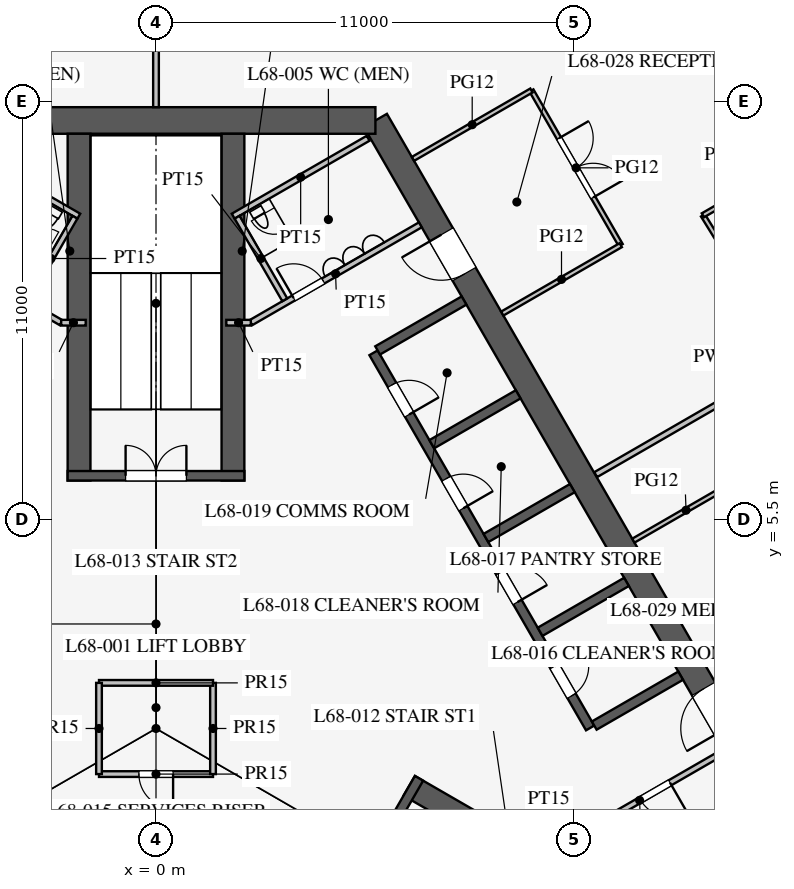
"""IFC4 building model, lengths in metres.
Left out: names, types, materials, properties, quantities, classifications, styles, units other than length and angle.
Written with IfcOpenShell. Run it as: python <this file> out.ifc"""

import sys

from ifc_helpers import new_model, si_unit, direction, frame, frame_2d, origin, place, context, subcontext, project, spatial, rectangle, extrude, element, fill, save


model = new_model("IFC4")
c1 = context("Model", 3, precision=1e-05, world=origin(), true_north=direction((0.0, 1.0)))
c2 = subcontext(c1, "Body", "Model", "MODEL_VIEW")
j1 = project(units=[si_unit("LENGTHUNIT", "METRE"), si_unit("PLANEANGLEUNIT", "RADIAN")], contexts=[c1])
p1 = place(None, origin())
s1 = spatial("IfcSite", under=j1, at=p1, CompositionType="ELEMENT")
p2 = place(p1, origin())
s2 = spatial("IfcBuilding", under=s1, at=p2, CompositionType="ELEMENT")
p3 = place(p2, frame((0.0, 0.0, 297.3)))
s3 = spatial("IfcBuildingStorey", under=s2, at=p3, CompositionType="ELEMENT", Elevation=297.3)
p4 = place(p3, frame((16.743, -3.0, 0.0), z_axis=(0.0, 0.0, 1.0), x_axis=(-0.500002442456, 0.866023993627, 0.0)))
e1 = element("IfcWall", 1, at=p4, inside=s3, PredefinedType="SHEAR", context=c2, shape_type="SweptSolid", body=[
    extrude(rectangle(XDim=21.939, YDim=0.7, at=frame_2d((10.97, 0.0))), origin(), (0.0, 0.0, 1.0), 4.2),
])
p5 = place(p4, frame((17.27, 0.0, 0.0)))
e2 = element("IfcOpeningElement", 2, at=p5, cuts=e1, PredefinedType="OPENING", context=c2, shape_type="SweptSolid", body=[
    extrude(rectangle(XDim=1.2, YDim=2.1, at=frame_2d((0.6, 1.05))), frame((0.0, 0.36, 0.0), z_axis=(0.0, -1.0, 0.0), x_axis=(1.0, 0.0, 0.0)), (0.0, 0.0, 1.0), 0.72),
])
p6 = place(p4, frame((3.47, 0.0, 0.0)))
e3 = element("IfcOpeningElement", 3, at=p6, cuts=e1, PredefinedType="OPENING", context=c2, shape_type="SweptSolid", body=[
    extrude(rectangle(XDim=1.2, YDim=2.1, at=frame_2d((0.6, 1.05))), frame((0.0, 0.36, 0.0), z_axis=(0.0, -1.0, 0.0), x_axis=(1.0, 0.0, 0.0)), (0.0, 0.0, 1.0), 0.72),
])
p7 = place(p3, frame((5.773, 16.0, 0.0), z_axis=(0.0, 0.0, 1.0), x_axis=(-1.0, 0.0, 0.0)))
e4 = element("IfcWall", 4, at=p7, inside=s3, PredefinedType="SHEAR", context=c2, shape_type="SweptSolid", body=[
    extrude(rectangle(XDim=11.547, YDim=0.7, at=frame_2d((5.773, 0.0))), origin(), (0.0, 0.0, 1.0), 4.2),
])
p8 = place(p3, frame((11.424, 0.014, 0.0), z_axis=(0.0, 0.0, 1.0), x_axis=(-0.500001763848, 0.866024385424, 0.0)))
e5 = element("IfcWall", 5, at=p8, inside=s3, PredefinedType="SHEAR", context=c2, shape_type="SweptSolid", body=[
    extrude(rectangle(XDim=11.4, YDim=0.25, at=frame_2d((5.7, 0.0))), origin(), (0.0, 0.0, 1.0), 4.2),
])
p9 = place(p8, frame((0.975, 0.0, 0.0)))
e6 = element("IfcOpeningElement", 6, at=p9, cuts=e5, PredefinedType="OPENING", context=c2, shape_type="SweptSolid", body=[
    extrude(rectangle(XDim=0.9, YDim=2.1, at=frame_2d((0.45, 1.05))), frame((0.0, 0.135, 0.0), z_axis=(0.0, -1.0, 0.0), x_axis=(1.0, 0.0, 0.0)), (0.0, 0.0, 1.0), 0.27),
])
p10 = place(p8, frame((3.825, 0.0, 0.0)))
e7 = element("IfcOpeningElement", 7, at=p10, cuts=e5, PredefinedType="OPENING", context=c2, shape_type="SweptSolid", body=[
    extrude(rectangle(XDim=0.9, YDim=2.1, at=frame_2d((0.45, 1.05))), frame((0.0, 0.135, 0.0), z_axis=(0.0, -1.0, 0.0), x_axis=(1.0, 0.0, 0.0)), (0.0, 0.0, 1.0), 0.27),
])
p11 = place(p8, frame((6.675, 0.0, 0.0)))
e8 = element("IfcOpeningElement", 8, at=p11, cuts=e5, PredefinedType="OPENING", context=c2, shape_type="SweptSolid", body=[
    extrude(rectangle(XDim=0.9, YDim=2.1, at=frame_2d((0.45, 1.05))), frame((0.0, 0.135, 0.0), z_axis=(0.0, -1.0, 0.0), x_axis=(1.0, 0.0, 0.0)), (0.0, 0.0, 1.0), 0.27),
])
p12 = place(p8, frame((9.525, 0.0, 0.0)))
e9 = element("IfcOpeningElement", 9, at=p12, cuts=e5, PredefinedType="OPENING", context=c2, shape_type="SweptSolid", body=[
    extrude(rectangle(XDim=0.9, YDim=2.1, at=frame_2d((0.45, 1.05))), frame((0.0, 0.135, 0.0), z_axis=(0.0, -1.0, 0.0), x_axis=(1.0, 0.0, 0.0)), (0.0, 0.0, 1.0), 0.27),
])
for number, where, z_axis, x_axis in (
    (10, (11.532, 0.076, 0.0), (0.0, 0.0, 1.0), (0.866, 0.5, 0.0)),
    (11, (10.107, 2.544, 0.0), (0.0, 0.0, 1.0), (0.866, 0.5, 0.0)),
    (12, (8.682, 5.012, 0.0), (0.0, 0.0, 1.0), (0.866, 0.5, 0.0)),
    (13, (7.257, 7.481, 0.0), (0.0, 0.0, 1.0), (0.866, 0.5, 0.0)),
    (14, (5.832, 9.949, 0.0), (0.0, 0.0, 1.0), (0.866, 0.5, 0.0)),
):
    element("IfcWall", number, at=place(p3, frame(where, z_axis=z_axis, x_axis=x_axis)), inside=s3, PredefinedType="SHEAR", context=c2, shape_type="SweptSolid", body=[
        extrude(rectangle(XDim=2.625, YDim=0.25, at=frame_2d((1.312, 0.0))), origin(), (0.0, 0.0, 1.0), 4.2),
    ])
p13 = place(p3, frame((6.663, -1.509, 0.0), z_axis=(0.0, 0.0, 1.0), x_axis=(0.866028310072, -0.499994966129, 0.0)))
e15 = element("IfcWall", 15, at=p13, inside=s3, PredefinedType="SHEAR", context=c2, shape_type="SweptSolid", body=[
    extrude(rectangle(XDim=9.125, YDim=0.6, at=frame_2d((4.562, 0.0))), origin(), (0.0, 0.0, 1.0), 4.2),
])
p14 = place(p3, frame((4.597, -5.339, 0.0), z_axis=(0.0, 0.0, 1.0), x_axis=(0.499984536904, 0.866034331223, 0.0)))
e16 = element("IfcWall", 16, at=p14, inside=s3, PredefinedType="SHEAR", context=c2, shape_type="SweptSolid", body=[
    extrude(rectangle(XDim=4.65, YDim=0.25, at=frame_2d((2.325, 0.0))), origin(), (0.0, 0.0, 1.0), 4.2),
])
p15 = place(p14, frame((1.525, 0.0, 0.0)))
e17 = element("IfcOpeningElement", 17, at=p15, cuts=e16, PredefinedType="OPENING", context=c2, shape_type="SweptSolid", body=[
    extrude(rectangle(XDim=1.6, YDim=2.1, at=frame_2d((0.8, 1.05))), frame((0.0, 0.135, 0.0), z_axis=(0.0, -1.0, 0.0), x_axis=(1.0, 0.0, 0.0)), (0.0, 0.0, 1.0), 0.27),
])
for number, where, z_axis, x_axis in (
    (18, (2.025, 6.525, 0.0), (0.0, 0.0, 1.0), (0.0, 1.0, 0.0)),
    (19, (-2.025, 6.525, 0.0), (0.0, 0.0, 1.0), (0.0, 1.0, 0.0)),
):
    element("IfcWall", number, at=place(p3, frame(where, z_axis=z_axis, x_axis=x_axis)), inside=s3, PredefinedType="SHEAR", context=c2, shape_type="SweptSolid", body=[
        extrude(rectangle(XDim=9.125, YDim=0.6, at=frame_2d((4.562, 0.0))), origin(), (0.0, 0.0, 1.0), 4.2),
    ])
p16 = place(p3, frame((2.325, 6.65, 0.0), z_axis=(0.0, 0.0, 1.0), x_axis=(-1.0, 0.0, 0.0)))
e20 = element("IfcWall", 20, at=p16, inside=s3, PredefinedType="SHEAR", context=c2, shape_type="SweptSolid", body=[
    extrude(rectangle(XDim=4.65, YDim=0.25, at=frame_2d((2.325, 0.0))), origin(), (0.0, 0.0, 1.0), 4.2),
])
p17 = place(p16, frame((1.525, 0.0, 0.0)))
e21 = element("IfcOpeningElement", 21, at=p17, cuts=e20, PredefinedType="OPENING", context=c2, shape_type="SweptSolid", body=[
    extrude(rectangle(XDim=1.6, YDim=2.1, at=frame_2d((0.8, 1.05))), frame((0.0, 0.135, 0.0), z_axis=(0.0, -1.0, 0.0), x_axis=(1.0, 0.0, 0.0)), (0.0, 0.0, 1.0), 0.27),
])
p18 = place(p3, frame((2.495, 10.678, 0.0), z_axis=(0.0, 0.0, 1.0), x_axis=(0.866037967349, 0.499978238636, 0.0)))
e22 = element("IfcWall", 22, at=p18, inside=s3, PredefinedType="PARTITIONING", context=c2, shape_type="SweptSolid", body=[
    extrude(rectangle(XDim=5.15, YDim=0.15, at=frame_2d((2.575, 0.0))), origin(), (0.0, 0.0, 1.0), 4.0),
])
p19 = place(p18, frame((1.3, 0.0, 0.0)))
e23 = element("IfcOpeningElement", 23, at=p19, cuts=e22, PredefinedType="OPENING", context=c2, shape_type="SweptSolid", body=[
    extrude(rectangle(XDim=0.9, YDim=2.1, at=frame_2d((0.45, 1.05))), frame((0.0, 0.085, 0.0), z_axis=(0.0, -1.0, 0.0), x_axis=(1.0, 0.0, 0.0)), (0.0, 0.0, 1.0), 0.17),
])
p20 = place(p3, frame((10.495, -3.178, 0.0), z_axis=(0.0, 0.0, 1.0), x_axis=(0.866037967349, 0.499978238636, 0.0)))
e24 = element("IfcWall", 24, at=p20, inside=s3, PredefinedType="PARTITIONING", context=c2, shape_type="SweptSolid", body=[
    extrude(rectangle(XDim=5.15, YDim=0.15, at=frame_2d((2.575, 0.0))), origin(), (0.0, 0.0, 1.0), 4.0),
])
p21 = place(p20, frame((2.6, 0.0, 0.0)))
e25 = element("IfcOpeningElement", 25, at=p21, cuts=e24, PredefinedType="OPENING", context=c2, shape_type="SweptSolid", body=[
    extrude(rectangle(XDim=0.9, YDim=2.1, at=frame_2d((0.45, 1.05))), frame((0.0, 0.085, 0.0), z_axis=(0.0, -1.0, 0.0), x_axis=(1.0, 0.0, 0.0)), (0.0, 0.0, 1.0), 0.17),
])
p22 = place(p3, frame((-2.495, 10.678, 0.0), z_axis=(0.0, 0.0, 1.0), x_axis=(-0.866037967349, 0.499978238636, 0.0)))
e26 = element("IfcWall", 26, at=p22, inside=s3, PredefinedType="PARTITIONING", context=c2, shape_type="SweptSolid", body=[
    extrude(rectangle(XDim=5.15, YDim=0.15, at=frame_2d((2.575, 0.0))), origin(), (0.0, 0.0, 1.0), 4.0),
])
p23 = place(p22, frame((2.6, 0.0, 0.0)))
e27 = element("IfcOpeningElement", 27, at=p23, cuts=e26, PredefinedType="OPENING", context=c2, shape_type="SweptSolid", body=[
    extrude(rectangle(XDim=0.9, YDim=2.1, at=frame_2d((0.45, 1.05))), frame((0.0, 0.085, 0.0), z_axis=(0.0, -1.0, 0.0), x_axis=(1.0, 0.0, 0.0)), (0.0, 0.0, 1.0), 0.17),
])
for number, where, z_axis, x_axis in (
    (28, (2.495, 10.678, 0.0), (0.0, 0.0, 1.0), (-1.0, 0.0, 0.0)),
    (29, (-2.495, 10.678, 0.0), (0.0, 0.0, 1.0), (1.0, 0.0, 0.0)),
):
    element("IfcWall", number, at=place(p3, frame(where, z_axis=z_axis, x_axis=x_axis)), inside=s3, PredefinedType="PARTITIONING", context=c2, shape_type="SweptSolid", body=[
        extrude(rectangle(XDim=0.645, YDim=0.15, at=frame_2d((0.323, 0.0))), origin(), (0.0, 0.0, 1.0), 4.0),
    ])
p24 = place(p3, frame((2.031, 13.482, 0.0), z_axis=(0.0, 0.0, 1.0), x_axis=(0.866050731258, 0.499956128963, 0.0)))
e30 = element("IfcWall", 30, at=p24, inside=s3, PredefinedType="PARTITIONING", context=c2, shape_type="SweptSolid", body=[
    extrude(rectangle(XDim=4.1, YDim=0.15, at=frame_2d((2.05, 0.0))), origin(), (0.0, 0.0, 1.0), 4.0),
])
p25 = place(p3, frame((3.389, 11.281, 0.0), z_axis=(0.0, 0.0, 1.0), x_axis=(-0.499989096993, 0.866031698547, 0.0)))
e31 = element("IfcWall", 31, at=p25, inside=s3, PredefinedType="PARTITIONING", context=c2, shape_type="SweptSolid", body=[
    extrude(rectangle(XDim=2.51, YDim=0.15, at=frame_2d((1.255, 0.0))), origin(), (0.0, 0.0, 1.0), 4.0),
])
p26 = place(p3, frame((-2.031, 13.482, 0.0), z_axis=(0.0, 0.0, 1.0), x_axis=(-0.866050731258, 0.499956128963, 0.0)))
e32 = element("IfcWall", 32, at=p26, inside=s3, PredefinedType="PARTITIONING", context=c2, shape_type="SweptSolid", body=[
    extrude(rectangle(XDim=4.1, YDim=0.15, at=frame_2d((2.05, 0.0))), origin(), (0.0, 0.0, 1.0), 4.0),
])
p27 = place(p3, frame((-3.389, 11.281, 0.0), z_axis=(0.0, 0.0, 1.0), x_axis=(0.499989096993, 0.866031698547, 0.0)))
e33 = element("IfcWall", 33, at=p27, inside=s3, PredefinedType="PARTITIONING", context=c2, shape_type="SweptSolid", body=[
    extrude(rectangle(XDim=2.51, YDim=0.15, at=frame_2d((1.255, 0.0))), origin(), (0.0, 0.0, 1.0), 4.0),
])
p28 = place(p3, frame((-1.5, -1.2, 0.0), z_axis=(0.0, 0.0, 1.0), x_axis=(1.0, 0.0, 0.0)))
e34 = element("IfcWall", 34, at=p28, inside=s3, PredefinedType="PARTITIONING", context=c2, shape_type="SweptSolid", body=[
    extrude(rectangle(XDim=3.0, YDim=0.15, at=frame_2d((1.5, 0.0))), origin(), (0.0, 0.0, 1.0), 4.0),
])
p29 = place(p28, frame((1.05, 0.0, 0.0)))
e35 = element("IfcOpeningElement", 35, at=p29, cuts=e34, PredefinedType="OPENING", context=c2, shape_type="SweptSolid", body=[
    extrude(rectangle(XDim=0.9, YDim=2.1, at=frame_2d((0.45, 1.05))), frame((0.0, 0.085, 0.0), z_axis=(0.0, -1.0, 0.0), x_axis=(1.0, 0.0, 0.0)), (0.0, 0.0, 1.0), 0.17),
])
p30 = place(p3, frame((1.5, -1.2, 0.0), z_axis=(0.0, 0.0, 1.0), x_axis=(0.0, 1.0, 0.0)))
e36 = element("IfcWall", 36, at=p30, inside=s3, PredefinedType="PARTITIONING", context=c2, shape_type="SweptSolid", body=[
    extrude(rectangle(XDim=2.4, YDim=0.15, at=frame_2d((1.2, 0.0))), origin(), (0.0, 0.0, 1.0), 4.0),
])
p31 = place(p3, frame((1.5, 1.2, 0.0), z_axis=(0.0, 0.0, 1.0), x_axis=(-1.0, 0.0, 0.0)))
e37 = element("IfcWall", 37, at=p31, inside=s3, PredefinedType="PARTITIONING", context=c2, shape_type="SweptSolid", body=[
    extrude(rectangle(XDim=3.0, YDim=0.15, at=frame_2d((1.5, 0.0))), origin(), (0.0, 0.0, 1.0), 4.0),
])
p32 = place(p3, frame((-1.5, 1.2, 0.0), z_axis=(0.0, 0.0, 1.0), x_axis=(0.0, -1.0, 0.0)))
e38 = element("IfcWall", 38, at=p32, inside=s3, PredefinedType="PARTITIONING", context=c2, shape_type="SweptSolid", body=[
    extrude(rectangle(XDim=2.4, YDim=0.15, at=frame_2d((1.2, 0.0))), origin(), (0.0, 0.0, 1.0), 4.0),
])
p33 = place(p3, frame((0.0, 16.35, 0.0), z_axis=(0.0, 0.0, 1.0), x_axis=(0.0, 1.0, 0.0)))
e39 = element("IfcWall", 39, at=p33, inside=s3, PredefinedType="PARTITIONING", context=c2, shape_type="SweptSolid", body=[
    extrude(rectangle(XDim=13.4, YDim=0.15, at=frame_2d((6.7, 0.0))), origin(), (0.0, 0.0, 1.0), 2.5),
])
p34 = place(p3, frame((11.57, 6.68, 0.0), z_axis=(0.0, 0.0, 1.0), x_axis=(0.866019635725, 0.500009990439, 0.0)))
e40 = element("IfcWall", 40, at=p34, inside=s3, PredefinedType="PARTITIONING", context=c2, shape_type="SweptSolid", body=[
    extrude(rectangle(XDim=9.212, YDim=0.15, at=frame_2d((4.606, 0.0))), origin(), (0.0, 0.0, 1.0), 3.3),
])
p35 = place(p3, frame((12.229, 12.719, 0.0), z_axis=(0.0, 0.0, 1.0), x_axis=(-0.500016218704, 0.866016039709, 0.0)))
e41 = element("IfcWall", 41, at=p35, inside=s3, PredefinedType="PARTITIONING", context=c2, shape_type="SweptSolid", body=[
    extrude(rectangle(XDim=4.7, YDim=0.12, at=frame_2d((2.35, 0.0))), origin(), (0.0, 0.0, 1.0), 2.9),
])
p36 = place(p35, frame((1.45, 0.0, 0.15)))
e42 = element("IfcOpeningElement", 42, at=p36, cuts=e41, PredefinedType="OPENING", context=c2, shape_type="SweptSolid", body=[
    extrude(rectangle(XDim=1.8, YDim=2.1, at=frame_2d((0.9, 1.05))), frame((0.0, 0.07, 0.0), z_axis=(0.0, -1.0, 0.0), x_axis=(1.0, 0.0, 0.0)), (0.0, 0.0, 1.0), 0.14),
])
p37 = place(p3, frame((9.111, 10.918, 0.0), z_axis=(0.0, 0.0, 1.0), x_axis=(0.866035395735, 0.499982693035, 0.0)))
e43 = element("IfcWall", 43, at=p37, inside=s3, PredefinedType="PARTITIONING", context=c2, shape_type="SweptSolid", body=[
    extrude(rectangle(XDim=3.6, YDim=0.12, at=frame_2d((1.8, 0.0))), origin(), (0.0, 0.0, 1.0), 2.9),
])
p38 = place(p3, frame((6.761, 14.989, 0.0), z_axis=(0.0, 0.0, 1.0), x_axis=(0.866018442252, 0.500012057535, 0.0)))
e44 = element("IfcWall", 44, at=p38, inside=s3, PredefinedType="PARTITIONING", context=c2, shape_type="SweptSolid", body=[
    extrude(rectangle(XDim=3.6, YDim=0.12, at=frame_2d((1.8, 0.0))), origin(), (0.0, 0.0, 1.0), 2.9),
])
p39 = place(p3, frame((12.562, 4.943, 0.0), z_axis=(0.0, 0.0, 1.0), x_axis=(0.866008981251, 0.500028443584, 0.0)))
e45 = element("IfcWall", 45, at=p39, inside=s3, PredefinedType="PARTITIONING", context=c2, shape_type="SweptSolid", body=[
    extrude(rectangle(XDim=3.2, YDim=0.12, at=frame_2d((1.6, 0.0))), origin(), (0.0, 0.0, 1.0), 2.9),
])
p40 = place(p3, frame((14.361, 1.825, 0.0), z_axis=(0.0, 0.0, 1.0), x_axis=(0.866028054938, 0.499995408039, 0.0)))
e46 = element("IfcWall", 46, at=p40, inside=s3, PredefinedType="PARTITIONING", context=c2, shape_type="SweptSolid", body=[
    extrude(rectangle(XDim=3.2, YDim=0.12, at=frame_2d((1.6, 0.0))), origin(), (0.0, 0.0, 1.0), 2.9),
])
p41 = place(p3, frame((16.759, 9.676, 0.0), z_axis=(0.0, 0.0, 1.0), x_axis=(-0.525996140194, 0.850486954927, 0.0)))
e47 = element("IfcWall", 47, at=p41, inside=s3, PredefinedType="PARTITIONING", context=c2, shape_type="SweptSolid", body=[
    extrude(rectangle(XDim=4.502, YDim=0.12, at=frame_2d((2.251, 0.0))), origin(), (0.0, 0.0, 1.0), 2.9),
])
p42 = place(p41, frame((1.75, 0.0, 0.15)))
e48 = element("IfcOpeningElement", 48, at=p42, cuts=e47, PredefinedType="OPENING", context=c2, shape_type="SweptSolid", body=[
    extrude(rectangle(XDim=1.0, YDim=2.1, at=frame_2d((0.5, 1.05))), frame((0.0, 0.07, 0.0), z_axis=(0.0, -1.0, 0.0), x_axis=(1.0, 0.0, 0.0)), (0.0, 0.0, 1.0), 0.14),
])
p43 = place(p3, frame((14.391, 13.505, 0.0), z_axis=(0.0, 0.0, 1.0), x_axis=(0.866054182849, 0.499950149885, 0.0)))
e49 = element("IfcWall", 49, at=p43, inside=s3, PredefinedType="PARTITIONING", context=c2, shape_type="SweptSolid", body=[
    extrude(rectangle(XDim=3.218, YDim=0.12, at=frame_2d((1.609, 0.0))), origin(), (0.0, 0.0, 1.0), 2.9),
])
p44 = place(p19, origin())
e50 = element("IfcDoor", 50, at=p44, inside=s3, OperationType="SINGLE_SWING_LEFT", PredefinedType="DOOR", context=c2, shape_type="SweptSolid", body=[
    extrude(rectangle(XDim=0.9, YDim=2.1, at=frame_2d((0.45, 1.05))), frame((0.0, 0.025, 0.0), z_axis=(0.0, -1.0, 0.0), x_axis=(1.0, 0.0, 0.0)), (0.0, 0.0, 1.0), 0.05),
])
fill(e23, e50)
p45 = place(p21, frame((0.9, 0.0, 0.0), z_axis=(0.0, 0.0, 1.0), x_axis=(-1.0, 0.0, 0.0)))
e51 = element("IfcDoor", 51, at=p45, inside=s3, OperationType="SINGLE_SWING_LEFT", PredefinedType="DOOR", context=c2, shape_type="SweptSolid", body=[
    extrude(rectangle(XDim=0.9, YDim=2.1, at=frame_2d((0.45, 1.05))), frame((0.0, 0.025, 0.0), z_axis=(0.0, -1.0, 0.0), x_axis=(1.0, 0.0, 0.0)), (0.0, 0.0, 1.0), 0.05),
])
fill(e25, e51)
p46 = place(p29, frame((0.9, 0.0, 0.0), z_axis=(0.0, 0.0, 1.0), x_axis=(-1.0, 0.0, 0.0)))
e52 = element("IfcDoor", 52, at=p46, inside=s3, OperationType="SINGLE_SWING_LEFT", PredefinedType="DOOR", context=c2, shape_type="SweptSolid", body=[
    extrude(rectangle(XDim=0.9, YDim=2.1, at=frame_2d((0.45, 1.05))), frame((0.0, 0.025, 0.0), z_axis=(0.0, -1.0, 0.0), x_axis=(1.0, 0.0, 0.0)), (0.0, 0.0, 1.0), 0.05),
])
fill(e35, e52)
p47 = place(p17, frame((1.6, 0.0, 0.0), z_axis=(0.0, 0.0, 1.0), x_axis=(-1.0, 0.0, 0.0)))
e53 = element("IfcDoor", 53, at=p47, inside=s3, OperationType="DOUBLE_DOOR_SINGLE_SWING", PredefinedType="DOOR", context=c2, shape_type="SweptSolid", body=[
    extrude(rectangle(XDim=1.6, YDim=2.1, at=frame_2d((0.8, 1.05))), frame((0.0, 0.025, 0.0), z_axis=(0.0, -1.0, 0.0), x_axis=(1.0, 0.0, 0.0)), (0.0, 0.0, 1.0), 0.05),
])
fill(e21, e53)
p48 = place(p5, origin())
e54 = element("IfcDoor", 54, at=p48, inside=s3, OperationType="SINGLE_SWING_RIGHT", PredefinedType="DOOR", context=c2, shape_type="SweptSolid", body=[
    extrude(rectangle(XDim=1.2, YDim=2.1, at=frame_2d((0.6, 1.05))), frame((0.0, 0.025, 0.0), z_axis=(0.0, -1.0, 0.0), x_axis=(1.0, 0.0, 0.0)), (0.0, 0.0, 1.0), 0.05),
])
fill(e2, e54)
p49 = place(p6, origin())
e55 = element("IfcDoor", 55, at=p49, inside=s3, OperationType="SINGLE_SWING_LEFT", PredefinedType="DOOR", context=c2, shape_type="SweptSolid", body=[
    extrude(rectangle(XDim=1.2, YDim=2.1, at=frame_2d((0.6, 1.05))), frame((0.0, 0.025, 0.0), z_axis=(0.0, -1.0, 0.0), x_axis=(1.0, 0.0, 0.0)), (0.0, 0.0, 1.0), 0.05),
])
fill(e3, e55)
p50 = place(p9, frame((0.9, 0.0, 0.0), z_axis=(0.0, 0.0, 1.0), x_axis=(-1.0, 0.0, 0.0)))
e56 = element("IfcDoor", 56, at=p50, inside=s3, OperationType="SINGLE_SWING_LEFT", PredefinedType="DOOR", context=c2, shape_type="SweptSolid", body=[
    extrude(rectangle(XDim=0.9, YDim=2.1, at=frame_2d((0.45, 1.05))), frame((0.0, 0.025, 0.0), z_axis=(0.0, -1.0, 0.0), x_axis=(1.0, 0.0, 0.0)), (0.0, 0.0, 1.0), 0.05),
])
fill(e6, e56)
p51 = place(p10, frame((0.9, 0.0, 0.0), z_axis=(0.0, 0.0, 1.0), x_axis=(-1.0, 0.0, 0.0)))
e57 = element("IfcDoor", 57, at=p51, inside=s3, OperationType="SINGLE_SWING_RIGHT", PredefinedType="DOOR", context=c2, shape_type="SweptSolid", body=[
    extrude(rectangle(XDim=0.9, YDim=2.1, at=frame_2d((0.45, 1.05))), frame((0.0, 0.025, 0.0), z_axis=(0.0, -1.0, 0.0), x_axis=(1.0, 0.0, 0.0)), (0.0, 0.0, 1.0), 0.05),
])
fill(e7, e57)
p52 = place(p11, frame((0.9, 0.0, 0.0), z_axis=(0.0, 0.0, 1.0), x_axis=(-1.0, 0.0, 0.0)))
e58 = element("IfcDoor", 58, at=p52, inside=s3, OperationType="SINGLE_SWING_RIGHT", PredefinedType="DOOR", context=c2, shape_type="SweptSolid", body=[
    extrude(rectangle(XDim=0.9, YDim=2.1, at=frame_2d((0.45, 1.05))), frame((0.0, 0.025, 0.0), z_axis=(0.0, -1.0, 0.0), x_axis=(1.0, 0.0, 0.0)), (0.0, 0.0, 1.0), 0.05),
])
fill(e8, e58)
p53 = place(p12, frame((0.9, 0.0, 0.0), z_axis=(0.0, 0.0, 1.0), x_axis=(-1.0, 0.0, 0.0)))
e59 = element("IfcDoor", 59, at=p53, inside=s3, OperationType="SINGLE_SWING_RIGHT", PredefinedType="DOOR", context=c2, shape_type="SweptSolid", body=[
    extrude(rectangle(XDim=0.9, YDim=2.1, at=frame_2d((0.45, 1.05))), frame((0.0, 0.025, 0.0), z_axis=(0.0, -1.0, 0.0), x_axis=(1.0, 0.0, 0.0)), (0.0, 0.0, 1.0), 0.05),
])
fill(e9, e59)
p54 = place(p36, frame((1.8, 0.0, 0.0), z_axis=(0.0, 0.0, 1.0), x_axis=(-1.0, 0.0, 0.0)))
e60 = element("IfcDoor", 60, at=p54, inside=s3, OperationType="DOUBLE_DOOR_SINGLE_SWING", PredefinedType="DOOR", context=c2, shape_type="SweptSolid", body=[
    extrude(rectangle(XDim=1.8, YDim=2.1, at=frame_2d((0.9, 1.05))), frame((0.0, 0.025, 0.0), z_axis=(0.0, -1.0, 0.0), x_axis=(1.0, 0.0, 0.0)), (0.0, 0.0, 1.0), 0.05),
])
fill(e42, e60)
save(model, sys.argv[1])
